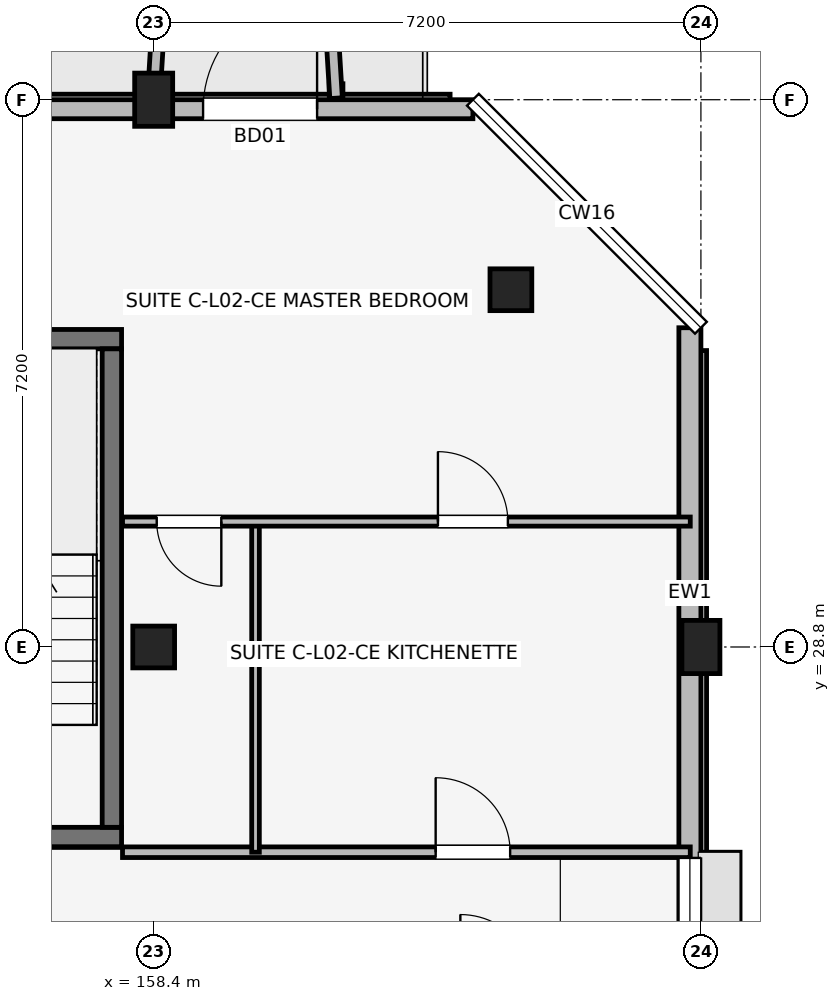
"""IFC4 building model, lengths in metres.
Left out: names, types, materials, properties, quantities, classifications, styles, units other than length and angle.
Written with IfcOpenShell. Run it as: python <this file> out.ifc"""

import sys

from ifc_helpers import new_model, si_unit, direction, frame, frame_2d, origin, origin_2d, place, context, subcontext, project, spatial, rectangle, extrude, element, fill, save


model = new_model("IFC4")
c1 = context("Model", 3, precision=1e-05, world=origin(), true_north=direction((0.0, 1.0)))
c2 = subcontext(c1, "Body", "Model", "MODEL_VIEW")
j1 = project(units=[si_unit("LENGTHUNIT", "METRE"), si_unit("PLANEANGLEUNIT", "RADIAN")], contexts=[c1])
p1 = place(None, origin())
s1 = spatial("IfcSite", under=j1, at=p1, CompositionType="ELEMENT")
p2 = place(p1, origin())
s2 = spatial("IfcBuilding", under=s1, at=p2, CompositionType="ELEMENT")
p3 = place(p2, frame((0.0, 0.0, 8.7)))
s3 = spatial("IfcBuildingStorey", under=s2, at=p3, CompositionType="ELEMENT", Elevation=8.7)
p4 = place(p3, frame((158.4, 28.8, 0.0), z_axis=(0.0, 0.0, 1.0), x_axis=(1.0, 0.0, 0.0)))
e1 = element("IfcColumn", 1, at=p4, inside=s3, PredefinedType="COLUMN", context=c2, shape_type="SweptSolid", body=[
    extrude(rectangle(XDim=0.55, YDim=0.55, at=origin_2d()), origin(), (0.0, 0.0, 1.0), 3.15),
])
for number, where, z_axis, x_axis in (
    (2, (158.4, 36.0, 0.0), (0.0, 0.0, 1.0), (1.0, 0.0, 0.0)),
    (3, (165.6, 28.8, 0.0), (0.0, 0.0, 1.0), (1.0, 0.0, 0.0)),
):
    element("IfcColumn", number, at=place(p3, frame(where, z_axis=z_axis, x_axis=x_axis)), inside=s3, PredefinedType="COLUMN", context=c2, shape_type="SweptSolid", body=[
        extrude(rectangle(XDim=0.5, YDim=0.7, at=origin_2d()), origin(), (0.0, 0.0, 1.0), 3.15),
    ])
p5 = place(p3, frame((163.1, 33.5, 0.0), z_axis=(0.0, 0.0, 1.0), x_axis=(1.0, 0.0, 0.0)))
e4 = element("IfcColumn", 4, at=p5, inside=s3, PredefinedType="COLUMN", context=c2, shape_type="SweptSolid", body=[
    extrude(rectangle(XDim=0.55, YDim=0.55, at=origin_2d()), origin(), (0.0, 0.0, 1.0), 3.15),
])
p6 = place(p3, frame((154.673, 26.3, 0.0), z_axis=(0.0, 0.0, 1.0), x_axis=(1.0, 0.0, 0.0)))
e5 = element("IfcWall", 5, at=p6, inside=s3, PredefinedType="SHEAR", context=c2, shape_type="SweptSolid", body=[
    extrude(rectangle(XDim=3.305, YDim=0.255, at=frame_2d((1.652, 0.0))), origin(), (0.0, 0.0, 1.0), 3.15),
])
p7 = place(p6, frame((1.127, 0.0, 0.0)))
e6 = element("IfcOpeningElement", 6, at=p7, cuts=e5, PredefinedType="OPENING", context=c2, shape_type="SweptSolid", body=[
    extrude(rectangle(XDim=1.05, YDim=2.12, at=frame_2d((0.525, 1.06))), frame((0.0, 0.137, 0.0), z_axis=(0.0, -1.0, 0.0), x_axis=(1.0, 0.0, 0.0)), (0.0, 0.0, 1.0), 0.275),
])
p8 = place(p3, frame((154.673, 32.85, 0.0), z_axis=(0.0, 0.0, 1.0), x_axis=(1.0, 0.0, 0.0)))
e7 = element("IfcWall", 7, at=p8, inside=s3, PredefinedType="SHEAR", context=c2, shape_type="SweptSolid", body=[
    extrude(rectangle(XDim=3.305, YDim=0.255, at=frame_2d((1.652, 0.0))), origin(), (0.0, 0.0, 1.0), 3.15),
])
p9 = place(p3, frame((157.85, 26.427, 0.0), z_axis=(0.0, 0.0, 1.0), x_axis=(0.0, 1.0, 0.0)))
e8 = element("IfcWall", 8, at=p9, inside=s3, PredefinedType="SHEAR", context=c2, shape_type="SweptSolid", body=[
    extrude(rectangle(XDim=6.295, YDim=0.255, at=frame_2d((3.147, 0.0))), origin(), (0.0, 0.0, 1.0), 3.15),
])
p10 = place(p3, frame((165.455, 17.4, 0.0), z_axis=(0.0, 0.0, 1.0), x_axis=(0.0, 1.0, 0.0)))
e9 = element("IfcWall", 9, at=p10, inside=s3, PredefinedType="SOLIDWALL", context=c2, shape_type="SweptSolid", body=[
    extrude(rectangle(XDim=15.6, YDim=0.29, at=frame_2d((7.8, 0.0))), origin(), (0.0, 0.0, 1.0), 2.38),
])
p11 = place(p10, frame((6.975, 0.0, 1.05)))
e10 = element("IfcOpeningElement", 10, at=p11, cuts=e9, PredefinedType="OPENING", context=c2, shape_type="SweptSolid", body=[
    extrude(rectangle(XDim=1.65, YDim=1.15, at=frame_2d((0.825, 0.575))), frame((0.0, 0.155, 0.0), z_axis=(0.0, -1.0, 0.0), x_axis=(1.0, 0.0, 0.0)), (0.0, 0.0, 1.0), 0.31),
])
p12 = place(p10, frame((0.98, 0.0, 0.67)))
e11 = element("IfcOpeningElement", 11, at=p12, cuts=e9, PredefinedType="OPENING", context=c2, shape_type="SweptSolid", body=[
    extrude(rectangle(XDim=1.42, YDim=1.6, at=frame_2d((0.71, 0.8))), frame((0.0, 0.155, 0.0), z_axis=(0.0, -1.0, 0.0), x_axis=(1.0, 0.0, 0.0)), (0.0, 0.0, 1.0), 0.31),
])
p13 = place(p3, frame((162.6, 35.875, 0.0), z_axis=(0.0, 0.0, 1.0), x_axis=(-1.0, 0.0, 0.0)))
e12 = element("IfcWall", 12, at=p13, inside=s3, PredefinedType="SOLIDWALL", context=c2, shape_type="SweptSolid", body=[
    extrude(rectangle(XDim=30.0, YDim=0.25, at=frame_2d((15.0, 0.0))), origin(), (0.0, 0.0, 1.0), 2.43),
])
p14 = place(p13, frame((27.95, 0.0, 0.0), z_axis=(0.0, 0.0, 1.0), x_axis=(-1.0, 0.0, 0.0)))
e13 = element("IfcOpeningElement", 13, at=p14, cuts=e12, PredefinedType="OPENING", context=c2, shape_type="SweptSolid", body=[
    extrude(rectangle(XDim=1.5, YDim=2.15, at=frame_2d((0.75, 1.075))), frame((0.0, 0.135, 0.0), z_axis=(0.0, -1.0, 0.0), x_axis=(1.0, 0.0, 0.0)), (0.0, 0.0, 1.0), 0.27),
])
p15 = place(p13, frame((3.55, 0.0, 0.0), z_axis=(0.0, 0.0, 1.0), x_axis=(-1.0, 0.0, 0.0)))
e14 = element("IfcOpeningElement", 14, at=p15, cuts=e12, PredefinedType="OPENING", context=c2, shape_type="SweptSolid", body=[
    extrude(rectangle(XDim=1.5, YDim=2.15, at=frame_2d((0.75, 1.075))), frame((0.0, 0.135, 0.0), z_axis=(0.0, -1.0, 0.0), x_axis=(1.0, 0.0, 0.0)), (0.0, 0.0, 1.0), 0.27),
])
p16 = place(p13, frame((14.425, 0.0, 0.5)))
e15 = element("IfcOpeningElement", 15, at=p16, cuts=e12, PredefinedType="OPENING", context=c2, shape_type="SweptSolid", body=[
    extrude(rectangle(XDim=1.15, YDim=1.68, at=frame_2d((0.575, 0.84))), frame((0.0, 0.135, 0.0), z_axis=(0.0, -1.0, 0.0), x_axis=(1.0, 0.0, 0.0)), (0.0, 0.0, 1.0), 0.27),
])
p17 = place(p13, frame((9.125, 0.0, 0.7)))
e16 = element("IfcOpeningElement", 16, at=p17, cuts=e12, PredefinedType="OPENING", context=c2, shape_type="SweptSolid", body=[
    extrude(rectangle(XDim=1.86, YDim=1.6, at=frame_2d((0.93, 0.8))), frame((0.0, 0.135, 0.0), z_axis=(0.0, -1.0, 0.0), x_axis=(1.0, 0.0, 0.0)), (0.0, 0.0, 1.0), 0.27),
])
p18 = place(p13, frame((19.015, 0.0, 0.7)))
e17 = element("IfcOpeningElement", 17, at=p18, cuts=e12, PredefinedType="OPENING", context=c2, shape_type="SweptSolid", body=[
    extrude(rectangle(XDim=1.86, YDim=1.6, at=frame_2d((0.93, 0.8))), frame((0.0, 0.135, 0.0), z_axis=(0.0, -1.0, 0.0), x_axis=(1.0, 0.0, 0.0)), (0.0, 0.0, 1.0), 0.27),
])
for number, where, z_axis, x_axis in (
    (18, (158.4, 36.02, 0.0), (0.0, 0.0, 1.0), (0.061, 0.998, 0.0)),
    (19, (160.8, 36.02, 0.0), (0.0, 0.0, 1.0), (-0.061, 0.998, 0.0)),
):
    element("IfcWall", number, at=place(p3, frame(where, z_axis=z_axis, x_axis=x_axis)), inside=s3, PredefinedType="ELEMENTEDWALL", context=c2, shape_type="SweptSolid", body=[
        extrude(rectangle(XDim=1.964, YDim=0.165, at=frame_2d((0.982, 0.0))), origin(), (0.0, 0.0, 1.0), 2.95),
    ])
p19 = place(p3, frame((157.99, 26.1, 0.0), z_axis=(0.0, 0.0, 1.0), x_axis=(1.0, 0.0, 0.0)))
e20 = element("IfcWall", 20, at=p19, inside=s3, PredefinedType="PARTITIONING", context=c2, shape_type="SweptSolid", body=[
    extrude(rectangle(XDim=7.47, YDim=0.14, at=frame_2d((3.735, 0.0))), origin(), (0.0, 0.0, 1.0), 2.38),
])
p20 = place(p19, frame((4.12, 0.0, 0.0)))
e21 = element("IfcOpeningElement", 21, at=p20, cuts=e20, PredefinedType="OPENING", context=c2, shape_type="SweptSolid", body=[
    extrude(rectangle(XDim=0.98, YDim=2.1, at=frame_2d((0.49, 1.05))), frame((0.0, 0.08, 0.0), z_axis=(0.0, -1.0, 0.0), x_axis=(1.0, 0.0, 0.0)), (0.0, 0.0, 1.0), 0.16),
])
p21 = place(p3, frame((159.74, 26.1, 0.0), z_axis=(0.0, 0.0, 1.0), x_axis=(0.0, 1.0, 0.0)))
e22 = element("IfcWall", 22, at=p21, inside=s3, PredefinedType="PARTITIONING", context=c2, shape_type="SweptSolid", body=[
    extrude(rectangle(XDim=4.35, YDim=0.1, at=frame_2d((2.175, 0.0))), origin(), (0.0, 0.0, 1.0), 2.375),
])
p22 = place(p3, frame((157.99, 30.45, 0.0), z_axis=(0.0, 0.0, 1.0), x_axis=(1.0, 0.0, 0.0)))
e23 = element("IfcWall", 23, at=p22, inside=s3, PredefinedType="PARTITIONING", context=c2, shape_type="SweptSolid", body=[
    extrude(rectangle(XDim=7.47, YDim=0.12, at=frame_2d((3.735, 0.0))), origin(), (0.0, 0.0, 1.0), 2.38),
])
p23 = place(p22, frame((1.3, 0.0, 0.0), z_axis=(0.0, 0.0, 1.0), x_axis=(-1.0, 0.0, 0.0)))
e24 = element("IfcOpeningElement", 24, at=p23, cuts=e23, PredefinedType="OPENING", context=c2, shape_type="SweptSolid", body=[
    extrude(rectangle(XDim=0.85, YDim=2.08, at=frame_2d((0.425, 1.04))), frame((0.0, 0.07, 0.0), z_axis=(0.0, -1.0, 0.0), x_axis=(1.0, 0.0, 0.0)), (0.0, 0.0, 1.0), 0.14),
])
p24 = place(p22, frame((4.15, 0.0, 0.0)))
e25 = element("IfcOpeningElement", 25, at=p24, cuts=e23, PredefinedType="OPENING", context=c2, shape_type="SweptSolid", body=[
    extrude(rectangle(XDim=0.92, YDim=2.08, at=frame_2d((0.46, 1.04))), frame((0.0, 0.07, 0.0), z_axis=(0.0, -1.0, 0.0), x_axis=(1.0, 0.0, 0.0)), (0.0, 0.0, 1.0), 0.14),
])
p25 = place(p15, origin())
e26 = element("IfcDoor", 26, at=p25, inside=s3, OperationType="SINGLE_SWING_LEFT", PredefinedType="DOOR", context=c2, shape_type="SweptSolid", body=[
    extrude(rectangle(XDim=1.5, YDim=2.15, at=frame_2d((0.75, 1.075))), frame((0.0, 0.025, 0.0), z_axis=(0.0, -1.0, 0.0), x_axis=(1.0, 0.0, 0.0)), (0.0, 0.0, 1.0), 0.05),
])
fill(e14, e26)
p26 = place(p11, origin())
e27 = element("IfcWindow", 27, at=p26, inside=s3, PartitioningType="SINGLE_PANEL", PredefinedType="WINDOW", context=c2, shape_type="SweptSolid", body=[
    extrude(rectangle(XDim=1.65, YDim=1.15, at=frame_2d((0.825, 0.575))), frame((0.0, 0.03, 0.0), z_axis=(0.0, -1.0, 0.0), x_axis=(1.0, 0.0, 0.0)), (0.0, 0.0, 1.0), 0.06),
])
fill(e10, e27)
p27 = place(p20, origin())
e28 = element("IfcDoor", 28, at=p27, inside=s3, OperationType="SINGLE_SWING_LEFT", PredefinedType="DOOR", context=c2, shape_type="SweptSolid", body=[
    extrude(rectangle(XDim=0.98, YDim=2.1, at=frame_2d((0.49, 1.05))), frame((0.0, 0.025, 0.0), z_axis=(0.0, -1.0, 0.0), x_axis=(1.0, 0.0, 0.0)), (0.0, 0.0, 1.0), 0.05),
])
fill(e21, e28)
p28 = place(p23, origin())
e29 = element("IfcDoor", 29, at=p28, inside=s3, OperationType="SINGLE_SWING_RIGHT", PredefinedType="DOOR", context=c2, shape_type="SweptSolid", body=[
    extrude(rectangle(XDim=0.85, YDim=2.08, at=frame_2d((0.425, 1.04))), frame((0.0, 0.025, 0.0), z_axis=(0.0, -1.0, 0.0), x_axis=(1.0, 0.0, 0.0)), (0.0, 0.0, 1.0), 0.05),
])
fill(e24, e29)
p29 = place(p24, origin())
e30 = element("IfcDoor", 30, at=p29, inside=s3, OperationType="SINGLE_SWING_LEFT", PredefinedType="DOOR", context=c2, shape_type="SweptSolid", body=[
    extrude(rectangle(XDim=0.92, YDim=2.08, at=frame_2d((0.46, 1.04))), frame((0.0, 0.025, 0.0), z_axis=(0.0, -1.0, 0.0), x_axis=(1.0, 0.0, 0.0)), (0.0, 0.0, 1.0), 0.05),
])
fill(e25, e30)
save(model, sys.argv[1])
